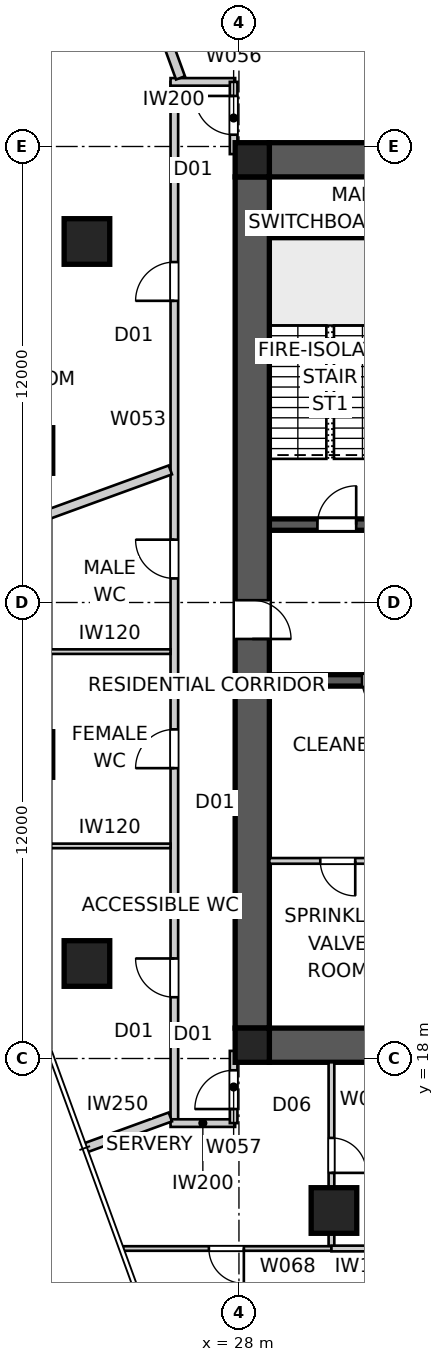
"""IFC4 building model, lengths in metres.
Left out: names, types, materials, properties, quantities, classifications, styles, units other than length and angle.
Written with IfcOpenShell. Run it as: python <this file> out.ifc"""

import sys

from ifc_helpers import new_model, si_unit, direction, frame, frame_2d, origin, origin_2d, place, context, subcontext, project, spatial, polyline, rectangle, outline, extrude, element, fill, save


model = new_model("IFC4")
c1 = context("Model", 3, precision=1e-05, world=origin(), true_north=direction((0.0, 1.0)))
c2 = subcontext(c1, "Body", "Model", "MODEL_VIEW")
j1 = project(units=[si_unit("LENGTHUNIT", "METRE"), si_unit("PLANEANGLEUNIT", "RADIAN")], contexts=[c1])
p1 = place(None, origin())
s1 = spatial("IfcSite", under=j1, at=p1, CompositionType="ELEMENT")
p2 = place(p1, origin())
s2 = spatial("IfcBuilding", under=s1, at=p2, CompositionType="ELEMENT")
p3 = place(p2, frame((0.0, 0.0, 138.8)))
s3 = spatial("IfcBuildingStorey", under=s2, at=p3, CompositionType="ELEMENT", Elevation=138.8)
for number, where, z_axis, x_axis in (
    (1, (28.8, 41.65, 0.0), (0.0, 0.0, 1.0), (1.0, 0.0, 0.0)),
    (2, (51.2, 18.35, 0.0), (0.0, 0.0, 1.0), (-1.0, 0.0, 0.0)),
):
    element("IfcWall", number, at=place(p3, frame(where, z_axis=z_axis, x_axis=x_axis)), inside=s3, PredefinedType="SHEAR", context=c2, shape_type="SweptSolid", body=[
        extrude(outline(polyline([(0.0, -0.45), (22.4, -0.45), (22.4, -0.025), (22.85, -0.025), (22.85, 0.025), (22.4, 0.025), (22.4, 0.45), (0.0, 0.45), (0.0, 0.025), (-0.45, 0.025), (-0.45, -0.025), (0.0, -0.025), (0.0, -0.45)])), origin(), (0.0, 0.0, 1.0), 5.0),
    ])
p4 = place(p3, frame((28.35, 41.2, 0.0), z_axis=(0.0, 0.0, 1.0), x_axis=(0.0, -1.0, 0.0)))
e3 = element("IfcWall", 3, at=p4, inside=s3, PredefinedType="SHEAR", context=c2, shape_type="SweptSolid", body=[
    extrude(outline(polyline([(0.0, -0.45), (22.4, -0.45), (22.4, -0.025), (22.85, -0.025), (22.85, 0.025), (22.4, 0.025), (22.4, 0.45), (0.0, 0.45), (0.0, 0.025), (-0.45, 0.025), (-0.45, -0.025), (0.0, -0.025), (0.0, -0.45)])), origin(), (0.0, 0.0, 1.0), 5.0),
])
p5 = place(p4, frame((11.14, 0.0, 0.0)))
e4 = element("IfcOpeningElement", 4, at=p5, cuts=e3, PredefinedType="OPENING", context=c2, shape_type="SweptSolid", body=[
    extrude(rectangle(XDim=1.02, YDim=2.4, at=frame_2d((0.51, 1.2))), frame((0.0, 0.46, 0.0), z_axis=(0.0, -1.0, 0.0), x_axis=(1.0, 0.0, 0.0)), (0.0, 0.0, 1.0), 0.92),
])
p6 = place(p3, frame((28.8, 32.05, 0.0), z_axis=(0.0, 0.0, 1.0), x_axis=(1.0, 0.0, 0.0)))
e5 = element("IfcWall", 5, at=p6, inside=s3, PredefinedType="SHEAR", context=c2, shape_type="SweptSolid", body=[
    extrude(rectangle(XDim=22.4, YDim=0.3, at=frame_2d((11.2, 0.0))), origin(), (0.0, 0.0, 1.0), 5.0),
])
p7 = place(p6, frame((19.04, 0.0, 0.0)))
e6 = element("IfcOpeningElement", 6, at=p7, cuts=e5, PredefinedType="OPENING", context=c2, shape_type="SweptSolid", body=[
    extrude(rectangle(XDim=0.92, YDim=2.1, at=frame_2d((0.46, 1.05))), frame((0.0, 0.16, 0.0), z_axis=(0.0, -1.0, 0.0), x_axis=(1.0, 0.0, 0.0)), (0.0, 0.0, 1.0), 0.32),
])
p8 = place(p6, frame((1.265, 0.0, 0.0)))
e7 = element("IfcOpeningElement", 7, at=p8, cuts=e5, PredefinedType="OPENING", context=c2, shape_type="SweptSolid", body=[
    extrude(rectangle(XDim=1.02, YDim=2.1, at=frame_2d((0.51, 1.05))), frame((0.0, 0.16, 0.0), z_axis=(0.0, -1.0, 0.0), x_axis=(1.0, 0.0, 0.0)), (0.0, 0.0, 1.0), 0.32),
])
p9 = place(p6, frame((4.015, 0.0, 0.0)))
e8 = element("IfcOpeningElement", 8, at=p9, cuts=e5, PredefinedType="OPENING", context=c2, shape_type="SweptSolid", body=[
    extrude(rectangle(XDim=0.92, YDim=2.1, at=frame_2d((0.46, 1.05))), frame((0.0, 0.16, 0.0), z_axis=(0.0, -1.0, 0.0), x_axis=(1.0, 0.0, 0.0)), (0.0, 0.0, 1.0), 0.32),
])
p10 = place(p6, frame((6.45, 0.0, 0.0)))
e9 = element("IfcOpeningElement", 9, at=p10, cuts=e5, PredefinedType="OPENING", context=c2, shape_type="SweptSolid", body=[
    extrude(rectangle(XDim=1.1, YDim=2.1, at=frame_2d((0.55, 1.05))), frame((0.0, 0.16, 0.0), z_axis=(0.0, -1.0, 0.0), x_axis=(1.0, 0.0, 0.0)), (0.0, 0.0, 1.0), 0.32),
])
p11 = place(p6, frame((9.25, 0.0, 0.0)))
e10 = element("IfcOpeningElement", 10, at=p11, cuts=e5, PredefinedType="OPENING", context=c2, shape_type="SweptSolid", body=[
    extrude(rectangle(XDim=1.1, YDim=2.1, at=frame_2d((0.55, 1.05))), frame((0.0, 0.16, 0.0), z_axis=(0.0, -1.0, 0.0), x_axis=(1.0, 0.0, 0.0)), (0.0, 0.0, 1.0), 0.32),
])
p12 = place(p6, frame((12.05, 0.0, 0.0)))
e11 = element("IfcOpeningElement", 11, at=p12, cuts=e5, PredefinedType="OPENING", context=c2, shape_type="SweptSolid", body=[
    extrude(rectangle(XDim=1.1, YDim=2.1, at=frame_2d((0.55, 1.05))), frame((0.0, 0.16, 0.0), z_axis=(0.0, -1.0, 0.0), x_axis=(1.0, 0.0, 0.0)), (0.0, 0.0, 1.0), 0.32),
])
p13 = place(p6, frame((14.85, 0.0, 0.0)))
e12 = element("IfcOpeningElement", 12, at=p13, cuts=e5, PredefinedType="OPENING", context=c2, shape_type="SweptSolid", body=[
    extrude(rectangle(XDim=1.1, YDim=2.1, at=frame_2d((0.55, 1.05))), frame((0.0, 0.16, 0.0), z_axis=(0.0, -1.0, 0.0), x_axis=(1.0, 0.0, 0.0)), (0.0, 0.0, 1.0), 0.32),
])
p14 = place(p3, frame((51.2, 27.95, 0.0), z_axis=(0.0, 0.0, 1.0), x_axis=(-1.0, 0.0, 0.0)))
e13 = element("IfcWall", 13, at=p14, inside=s3, PredefinedType="SHEAR", context=c2, shape_type="SweptSolid", body=[
    extrude(rectangle(XDim=22.4, YDim=0.3, at=frame_2d((11.2, 0.0))), origin(), (0.0, 0.0, 1.0), 5.0),
])
p15 = place(p14, frame((19.04, 0.0, 0.0)))
e14 = element("IfcOpeningElement", 14, at=p15, cuts=e13, PredefinedType="OPENING", context=c2, shape_type="SweptSolid", body=[
    extrude(rectangle(XDim=0.92, YDim=2.1, at=frame_2d((0.46, 1.05))), frame((0.0, 0.16, 0.0), z_axis=(0.0, -1.0, 0.0), x_axis=(1.0, 0.0, 0.0)), (0.0, 0.0, 1.0), 0.32),
])
p16 = place(p14, frame((1.265, 0.0, 0.0)))
e15 = element("IfcOpeningElement", 15, at=p16, cuts=e13, PredefinedType="OPENING", context=c2, shape_type="SweptSolid", body=[
    extrude(rectangle(XDim=1.02, YDim=2.1, at=frame_2d((0.51, 1.05))), frame((0.0, 0.16, 0.0), z_axis=(0.0, -1.0, 0.0), x_axis=(1.0, 0.0, 0.0)), (0.0, 0.0, 1.0), 0.32),
])
p17 = place(p14, frame((4.015, 0.0, 0.0)))
e16 = element("IfcOpeningElement", 16, at=p17, cuts=e13, PredefinedType="OPENING", context=c2, shape_type="SweptSolid", body=[
    extrude(rectangle(XDim=0.92, YDim=2.1, at=frame_2d((0.46, 1.05))), frame((0.0, 0.16, 0.0), z_axis=(0.0, -1.0, 0.0), x_axis=(1.0, 0.0, 0.0)), (0.0, 0.0, 1.0), 0.32),
])
p18 = place(p14, frame((6.45, 0.0, 0.0)))
e17 = element("IfcOpeningElement", 17, at=p18, cuts=e13, PredefinedType="OPENING", context=c2, shape_type="SweptSolid", body=[
    extrude(rectangle(XDim=1.1, YDim=2.1, at=frame_2d((0.55, 1.05))), frame((0.0, 0.16, 0.0), z_axis=(0.0, -1.0, 0.0), x_axis=(1.0, 0.0, 0.0)), (0.0, 0.0, 1.0), 0.32),
])
p19 = place(p14, frame((9.25, 0.0, 0.0)))
e18 = element("IfcOpeningElement", 18, at=p19, cuts=e13, PredefinedType="OPENING", context=c2, shape_type="SweptSolid", body=[
    extrude(rectangle(XDim=1.1, YDim=2.1, at=frame_2d((0.55, 1.05))), frame((0.0, 0.16, 0.0), z_axis=(0.0, -1.0, 0.0), x_axis=(1.0, 0.0, 0.0)), (0.0, 0.0, 1.0), 0.32),
])
p20 = place(p14, frame((12.05, 0.0, 0.0)))
e19 = element("IfcOpeningElement", 19, at=p20, cuts=e13, PredefinedType="OPENING", context=c2, shape_type="SweptSolid", body=[
    extrude(rectangle(XDim=1.1, YDim=2.1, at=frame_2d((0.55, 1.05))), frame((0.0, 0.16, 0.0), z_axis=(0.0, -1.0, 0.0), x_axis=(1.0, 0.0, 0.0)), (0.0, 0.0, 1.0), 0.32),
])
p21 = place(p14, frame((14.85, 0.0, 0.0)))
e20 = element("IfcOpeningElement", 20, at=p21, cuts=e13, PredefinedType="OPENING", context=c2, shape_type="SweptSolid", body=[
    extrude(rectangle(XDim=1.1, YDim=2.1, at=frame_2d((0.55, 1.05))), frame((0.0, 0.16, 0.0), z_axis=(0.0, -1.0, 0.0), x_axis=(1.0, 0.0, 0.0)), (0.0, 0.0, 1.0), 0.32),
])
p22 = place(p3, frame((28.8, 39.75, 0.0), z_axis=(0.0, 0.0, 1.0), x_axis=(1.0, 0.0, 0.0)))
e21 = element("IfcWall", 21, at=p22, inside=s3, PredefinedType="SHEAR", context=c2, shape_type="SweptSolid", body=[
    extrude(rectangle(XDim=3.5, YDim=0.3, at=frame_2d((1.75, 0.0))), origin(), (0.0, 0.0, 1.0), 5.0),
])
for number, where, z_axis, x_axis in (
    (22, (28.35, 18.35, 0.0), (0.0, 0.0, 1.0), (1.0, 0.0, 0.0)),
    (23, (28.35, 41.65, 0.0), (0.0, 0.0, 1.0), (1.0, 0.0, 0.0)),
):
    element("IfcColumn", number, at=place(p3, frame(where, z_axis=z_axis, x_axis=x_axis)), inside=s3, PredefinedType="COLUMN", context=c2, shape_type="SweptSolid", body=[
        extrude(rectangle(XDim=0.9, YDim=0.9, at=origin_2d()), origin(), (0.0, 0.0, 1.0), 5.0),
    ])
for number, where, z_axis, x_axis in (
    (24, (24.0, 39.5, 0.0), (0.0, 0.0, 1.0), (1.0, 0.0, 0.0)),
    (25, (22.5, 34.0, 0.0), (0.0, 0.0, 1.0), (1.0, 0.0, 0.0)),
    (26, (22.5, 26.0, 0.0), (0.0, 0.0, 1.0), (1.0, 0.0, 0.0)),
    (27, (24.0, 20.5, 0.0), (0.0, 0.0, 1.0), (1.0, 0.0, 0.0)),
    (28, (30.5, 14.0, 0.0), (0.0, 0.0, 1.0), (1.0, 0.0, 0.0)),
):
    element("IfcColumn", number, at=place(p3, frame(where, z_axis=z_axis, x_axis=x_axis)), inside=s3, PredefinedType="COLUMN", context=c2, shape_type="SweptSolid", body=[
        extrude(rectangle(XDim=1.2, YDim=1.2, at=origin_2d()), origin(), (0.0, 0.0, 1.0), 5.0),
    ])
p23 = place(p3, frame((26.3, 16.3, 0.0), z_axis=(0.0, 0.0, 1.0), x_axis=(0.0, 1.0, 0.0)))
e29 = element("IfcWall", 29, at=p23, inside=s3, PredefinedType="PARTITIONING", context=c2, shape_type="SweptSolid", body=[
    extrude(rectangle(XDim=27.4, YDim=0.2, at=frame_2d((13.7, 0.0))), origin(), (0.0, 0.0, 1.0), 4.85),
])
p24 = place(p23, frame((21.639, 0.0, 0.0)))
e30 = element("IfcOpeningElement", 30, at=p24, cuts=e29, PredefinedType="OPENING", context=c2, shape_type="SweptSolid", body=[
    extrude(rectangle(XDim=1.02, YDim=2.34, at=frame_2d((0.51, 1.17))), frame((0.0, 0.11, 0.0), z_axis=(0.0, -1.0, 0.0), x_axis=(1.0, 0.0, 0.0)), (0.0, 0.0, 1.0), 0.22),
])
p25 = place(p23, frame((3.312, 0.0, 0.0)))
e31 = element("IfcOpeningElement", 31, at=p25, cuts=e29, PredefinedType="OPENING", context=c2, shape_type="SweptSolid", body=[
    extrude(rectangle(XDim=1.02, YDim=2.34, at=frame_2d((0.51, 1.17))), frame((0.0, 0.11, 0.0), z_axis=(0.0, -1.0, 0.0), x_axis=(1.0, 0.0, 0.0)), (0.0, 0.0, 1.0), 0.22),
])
p26 = place(p23, frame((9.341, 0.0, 0.0)))
e32 = element("IfcOpeningElement", 32, at=p26, cuts=e29, PredefinedType="OPENING", context=c2, shape_type="SweptSolid", body=[
    extrude(rectangle(XDim=1.02, YDim=2.34, at=frame_2d((0.51, 1.17))), frame((0.0, 0.11, 0.0), z_axis=(0.0, -1.0, 0.0), x_axis=(1.0, 0.0, 0.0)), (0.0, 0.0, 1.0), 0.22),
])
p27 = place(p23, frame((14.333, 0.0, 0.0)))
e33 = element("IfcOpeningElement", 33, at=p27, cuts=e29, PredefinedType="OPENING", context=c2, shape_type="SweptSolid", body=[
    extrude(rectangle(XDim=1.02, YDim=2.34, at=frame_2d((0.51, 1.17))), frame((0.0, 0.11, 0.0), z_axis=(0.0, -1.0, 0.0), x_axis=(1.0, 0.0, 0.0)), (0.0, 0.0, 1.0), 0.22),
])
for number, where, z_axis, x_axis in (
    (34, (27.9, 43.7, 0.0), (0.0, 0.0, 1.0), (-1.0, 0.0, 0.0)),
    (35, (27.9, 16.3, 0.0), (0.0, 0.0, 1.0), (-1.0, 0.0, 0.0)),
):
    element("IfcWall", number, at=place(p3, frame(where, z_axis=z_axis, x_axis=x_axis)), inside=s3, PredefinedType="PARTITIONING", context=c2, shape_type="SweptSolid", body=[
        extrude(rectangle(XDim=1.7, YDim=0.2, at=frame_2d((0.85, 0.0))), origin(), (0.0, 0.0, 1.0), 4.85),
    ])
p28 = place(p3, frame((27.86, 41.8, 0.0), z_axis=(0.0, 0.0, 1.0), x_axis=(0.0, 1.0, 0.0)))
e36 = element("IfcWall", 36, at=p28, inside=s3, PredefinedType="PARTITIONING", context=c2, shape_type="SweptSolid", body=[
    extrude(rectangle(XDim=1.9, YDim=0.2, at=frame_2d((0.95, 0.0))), origin(), (0.0, 0.0, 1.0), 4.85),
])
p29 = place(p28, frame((0.51, 0.0, 0.0)))
e37 = element("IfcOpeningElement", 37, at=p29, cuts=e36, PredefinedType="OPENING", context=c2, shape_type="SweptSolid", body=[
    extrude(rectangle(XDim=1.02, YDim=2.34, at=frame_2d((0.51, 1.17))), frame((0.0, 0.11, 0.0), z_axis=(0.0, -1.0, 0.0), x_axis=(1.0, 0.0, 0.0)), (0.0, 0.0, 1.0), 0.22),
])
p30 = place(p3, frame((27.86, 16.3, 0.0), z_axis=(0.0, 0.0, 1.0), x_axis=(0.0, 1.0, 0.0)))
e38 = element("IfcWall", 38, at=p30, inside=s3, PredefinedType="PARTITIONING", context=c2, shape_type="SweptSolid", body=[
    extrude(rectangle(XDim=1.9, YDim=0.2, at=frame_2d((0.95, 0.0))), origin(), (0.0, 0.0, 1.0), 4.85),
])
p31 = place(p30, frame((0.37, 0.0, 0.0)))
e39 = element("IfcOpeningElement", 39, at=p31, cuts=e38, PredefinedType="OPENING", context=c2, shape_type="SweptSolid", body=[
    extrude(rectangle(XDim=1.02, YDim=2.34, at=frame_2d((0.51, 1.17))), frame((0.0, 0.11, 0.0), z_axis=(0.0, -1.0, 0.0), x_axis=(1.0, 0.0, 0.0)), (0.0, 0.0, 1.0), 0.22),
])
p32 = place(p3, frame((25.642, 46.058, 0.0), z_axis=(0.0, 0.0, 1.0), x_axis=(0.342021098348, -0.939692273186, 0.0)))
e40 = element("IfcWall", 40, at=p32, inside=s3, PredefinedType="PARTITIONING", context=c2, shape_type="SweptSolid", body=[
    extrude(rectangle(XDim=2.397, YDim=0.25, at=frame_2d((1.198, 0.0))), origin(), (0.0, 0.0, 1.0), 4.85),
])
p33 = place(p3, frame((18.47, 30.677, 0.0), z_axis=(0.0, 0.0, 1.0), x_axis=(0.939696268654, 0.342010120724, 0.0)))
e41 = element("IfcWall", 41, at=p33, inside=s3, PredefinedType="PARTITIONING", context=c2, shape_type="SweptSolid", body=[
    extrude(rectangle(XDim=8.221, YDim=0.25, at=frame_2d((4.11, 0.0))), origin(), (0.0, 0.0, 1.0), 4.85),
])
p34 = place(p3, frame((23.942, 15.642, 0.0), z_axis=(0.0, 0.0, 1.0), x_axis=(0.939692273186, 0.342021098348, 0.0)))
e42 = element("IfcWall", 42, at=p34, inside=s3, PredefinedType="PARTITIONING", context=c2, shape_type="SweptSolid", body=[
    extrude(rectangle(XDim=2.397, YDim=0.25, at=frame_2d((1.198, 0.0))), origin(), (0.0, 0.0, 1.0), 4.85),
])
p35 = place(p3, frame((32.4, 23.2, 0.0), z_axis=(0.0, 0.0, 1.0), x_axis=(-1.0, 0.0, 0.0)))
e43 = element("IfcWall", 43, at=p35, inside=s3, PredefinedType="SOLIDWALL", context=c2, shape_type="SweptSolid", body=[
    extrude(rectangle(XDim=3.6, YDim=0.15, at=frame_2d((1.8, 0.0))), origin(), (0.0, 0.0, 1.0), 4.85),
])
p36 = place(p35, frame((1.34, 0.0, 0.0)))
e44 = element("IfcOpeningElement", 44, at=p36, cuts=e43, PredefinedType="OPENING", context=c2, shape_type="SweptSolid", body=[
    extrude(rectangle(XDim=0.92, YDim=2.1, at=frame_2d((0.46, 1.05))), frame((0.0, 0.085, 0.0), z_axis=(0.0, -1.0, 0.0), x_axis=(1.0, 0.0, 0.0)), (0.0, 0.0, 1.0), 0.17),
])
for number, where, z_axis, x_axis in (
    (45, (23.0, 23.594, 0.0), (0.0, 0.0, 1.0), (1.0, 0.0, 0.0)),
    (46, (23.0, 28.707, 0.0), (0.0, 0.0, 1.0), (1.0, 0.0, 0.0)),
):
    element("IfcWall", number, at=place(p3, frame(where, z_axis=z_axis, x_axis=x_axis)), inside=s3, PredefinedType="PARTITIONING", context=c2, shape_type="SweptSolid", body=[
        extrude(rectangle(XDim=3.2, YDim=0.12, at=frame_2d((1.6, 0.0))), origin(), (0.0, 0.0, 1.0), 4.85),
    ])
p37 = place(p3, frame((30.434, 17.9, 0.0), z_axis=(0.0, 0.0, 1.0), x_axis=(0.0, -1.0, 0.0)))
e47 = element("IfcWall", 47, at=p37, inside=s3, PredefinedType="SOLIDWALL", context=c2, shape_type="SweptSolid", body=[
    extrude(rectangle(XDim=4.9, YDim=0.15, at=frame_2d((2.45, 0.0))), origin(), (0.0, 0.0, 1.0), 4.85),
])
p38 = place(p37, frame((1.99, 0.0, 0.0)))
e48 = element("IfcOpeningElement", 48, at=p38, cuts=e47, PredefinedType="OPENING", context=c2, shape_type="SweptSolid", body=[
    extrude(rectangle(XDim=0.92, YDim=2.1, at=frame_2d((0.46, 1.05))), frame((0.0, 0.085, 0.0), z_axis=(0.0, -1.0, 0.0), x_axis=(1.0, 0.0, 0.0)), (0.0, 0.0, 1.0), 0.17),
])
p39 = place(p3, frame((30.434, 13.0, 0.0), z_axis=(0.0, 0.0, 1.0), x_axis=(-1.0, 0.0, 0.0)))
e49 = element("IfcWall", 49, at=p39, inside=s3, PredefinedType="PARTITIONING", context=c2, shape_type="SweptSolid", body=[
    extrude(rectangle(XDim=5.488, YDim=0.12, at=frame_2d((2.744, 0.0))), origin(), (0.0, 0.0, 1.0), 4.85),
])
p40 = place(p39, frame((2.305, 0.0, 0.0)))
e50 = element("IfcOpeningElement", 50, at=p40, cuts=e49, PredefinedType="OPENING", context=c2, shape_type="SweptSolid", body=[
    extrude(rectangle(XDim=0.92, YDim=2.34, at=frame_2d((0.46, 1.17))), frame((0.0, 0.07, 0.0), z_axis=(0.0, -1.0, 0.0), x_axis=(1.0, 0.0, 0.0)), (0.0, 0.0, 1.0), 0.14),
])
p41 = place(p3, frame((33.322, 13.0, 0.0), z_axis=(0.0, 0.0, 1.0), x_axis=(-1.0, 0.0, 0.0)))
e51 = element("IfcWall", 51, at=p41, inside=s3, PredefinedType="SOLIDWALL", context=c2, shape_type="SweptSolid", body=[
    extrude(rectangle(XDim=2.887, YDim=0.15, at=frame_2d((1.444, 0.0))), origin(), (0.0, 0.0, 1.0), 4.85),
])
p42 = place(p15, origin())
e52 = element("IfcDoor", 52, at=p42, inside=s3, OperationType="SINGLE_SWING_LEFT", PredefinedType="DOOR", context=c2, shape_type="SweptSolid", body=[
    extrude(rectangle(XDim=0.92, YDim=2.1, at=frame_2d((0.46, 1.05))), frame((0.0, 0.025, 0.0), z_axis=(0.0, -1.0, 0.0), x_axis=(1.0, 0.0, 0.0)), (0.0, 0.0, 1.0), 0.05),
])
fill(e14, e52)
p43 = place(p8, origin())
e53 = element("IfcDoor", 53, at=p43, inside=s3, OperationType="SINGLE_SWING_RIGHT", PredefinedType="DOOR", context=c2, shape_type="SweptSolid", body=[
    extrude(rectangle(XDim=1.02, YDim=2.1, at=frame_2d((0.51, 1.05))), frame((0.0, 0.025, 0.0), z_axis=(0.0, -1.0, 0.0), x_axis=(1.0, 0.0, 0.0)), (0.0, 0.0, 1.0), 0.05),
])
fill(e7, e53)
p44 = place(p24, origin())
e54 = element("IfcDoor", 54, at=p44, inside=s3, OperationType="SINGLE_SWING_LEFT", PredefinedType="DOOR", context=c2, shape_type="SweptSolid", body=[
    extrude(rectangle(XDim=1.02, YDim=2.34, at=frame_2d((0.51, 1.17))), frame((0.0, 0.025, 0.0), z_axis=(0.0, -1.0, 0.0), x_axis=(1.0, 0.0, 0.0)), (0.0, 0.0, 1.0), 0.05),
])
fill(e30, e54)
p45 = place(p25, origin())
e55 = element("IfcDoor", 55, at=p45, inside=s3, OperationType="SINGLE_SWING_RIGHT", PredefinedType="DOOR", context=c2, shape_type="SweptSolid", body=[
    extrude(rectangle(XDim=1.02, YDim=2.34, at=frame_2d((0.51, 1.17))), frame((0.0, 0.025, 0.0), z_axis=(0.0, -1.0, 0.0), x_axis=(1.0, 0.0, 0.0)), (0.0, 0.0, 1.0), 0.05),
])
fill(e31, e55)
p46 = place(p26, origin())
e56 = element("IfcDoor", 56, at=p46, inside=s3, OperationType="SINGLE_SWING_LEFT", PredefinedType="DOOR", context=c2, shape_type="SweptSolid", body=[
    extrude(rectangle(XDim=1.02, YDim=2.34, at=frame_2d((0.51, 1.17))), frame((0.0, 0.025, 0.0), z_axis=(0.0, -1.0, 0.0), x_axis=(1.0, 0.0, 0.0)), (0.0, 0.0, 1.0), 0.05),
])
fill(e32, e56)
p47 = place(p27, origin())
e57 = element("IfcDoor", 57, at=p47, inside=s3, OperationType="SINGLE_SWING_RIGHT", PredefinedType="DOOR", context=c2, shape_type="SweptSolid", body=[
    extrude(rectangle(XDim=1.02, YDim=2.34, at=frame_2d((0.51, 1.17))), frame((0.0, 0.025, 0.0), z_axis=(0.0, -1.0, 0.0), x_axis=(1.0, 0.0, 0.0)), (0.0, 0.0, 1.0), 0.05),
])
fill(e33, e57)
p48 = place(p31, origin())
e58 = element("IfcDoor", 58, at=p48, inside=s3, OperationType="SINGLE_SWING_LEFT", PredefinedType="DOOR", context=c2, shape_type="SweptSolid", body=[
    extrude(rectangle(XDim=1.02, YDim=2.34, at=frame_2d((0.51, 1.17))), frame((0.0, 0.025, 0.0), z_axis=(0.0, -1.0, 0.0), x_axis=(1.0, 0.0, 0.0)), (0.0, 0.0, 1.0), 0.05),
])
fill(e39, e58)
p49 = place(p29, origin())
e59 = element("IfcDoor", 59, at=p49, inside=s3, OperationType="SINGLE_SWING_RIGHT", PredefinedType="DOOR", context=c2, shape_type="SweptSolid", body=[
    extrude(rectangle(XDim=1.02, YDim=2.34, at=frame_2d((0.51, 1.17))), frame((0.0, 0.025, 0.0), z_axis=(0.0, -1.0, 0.0), x_axis=(1.0, 0.0, 0.0)), (0.0, 0.0, 1.0), 0.05),
])
fill(e37, e59)
p50 = place(p36, origin())
e60 = element("IfcDoor", 60, at=p50, inside=s3, OperationType="SINGLE_SWING_LEFT", PredefinedType="DOOR", context=c2, shape_type="SweptSolid", body=[
    extrude(rectangle(XDim=0.92, YDim=2.1, at=frame_2d((0.46, 1.05))), frame((0.0, 0.025, 0.0), z_axis=(0.0, -1.0, 0.0), x_axis=(1.0, 0.0, 0.0)), (0.0, 0.0, 1.0), 0.05),
])
fill(e44, e60)
p51 = place(p40, origin())
e61 = element("IfcDoor", 61, at=p51, inside=s3, OperationType="SINGLE_SWING_LEFT", PredefinedType="DOOR", context=c2, shape_type="SweptSolid", body=[
    extrude(rectangle(XDim=0.92, YDim=2.34, at=frame_2d((0.46, 1.17))), frame((0.0, 0.025, 0.0), z_axis=(0.0, -1.0, 0.0), x_axis=(1.0, 0.0, 0.0)), (0.0, 0.0, 1.0), 0.05),
])
fill(e50, e61)
p52 = place(p38, origin())
e62 = element("IfcDoor", 62, at=p52, inside=s3, OperationType="SINGLE_SWING_RIGHT", PredefinedType="DOOR", context=c2, shape_type="SweptSolid", body=[
    extrude(rectangle(XDim=0.92, YDim=2.1, at=frame_2d((0.46, 1.05))), frame((0.0, 0.025, 0.0), z_axis=(0.0, -1.0, 0.0), x_axis=(1.0, 0.0, 0.0)), (0.0, 0.0, 1.0), 0.05),
])
fill(e48, e62)
p53 = place(p5, origin())
e63 = element("IfcDoor", 63, at=p53, inside=s3, OperationType="SINGLE_SWING_RIGHT", PredefinedType="DOOR", context=c2, shape_type="SweptSolid", body=[
    extrude(rectangle(XDim=1.02, YDim=2.4, at=frame_2d((0.51, 1.2))), frame((0.0, 0.025, 0.0), z_axis=(0.0, -1.0, 0.0), x_axis=(1.0, 0.0, 0.0)), (0.0, 0.0, 1.0), 0.05),
])
fill(e4, e63)
save(model, sys.argv[1])
